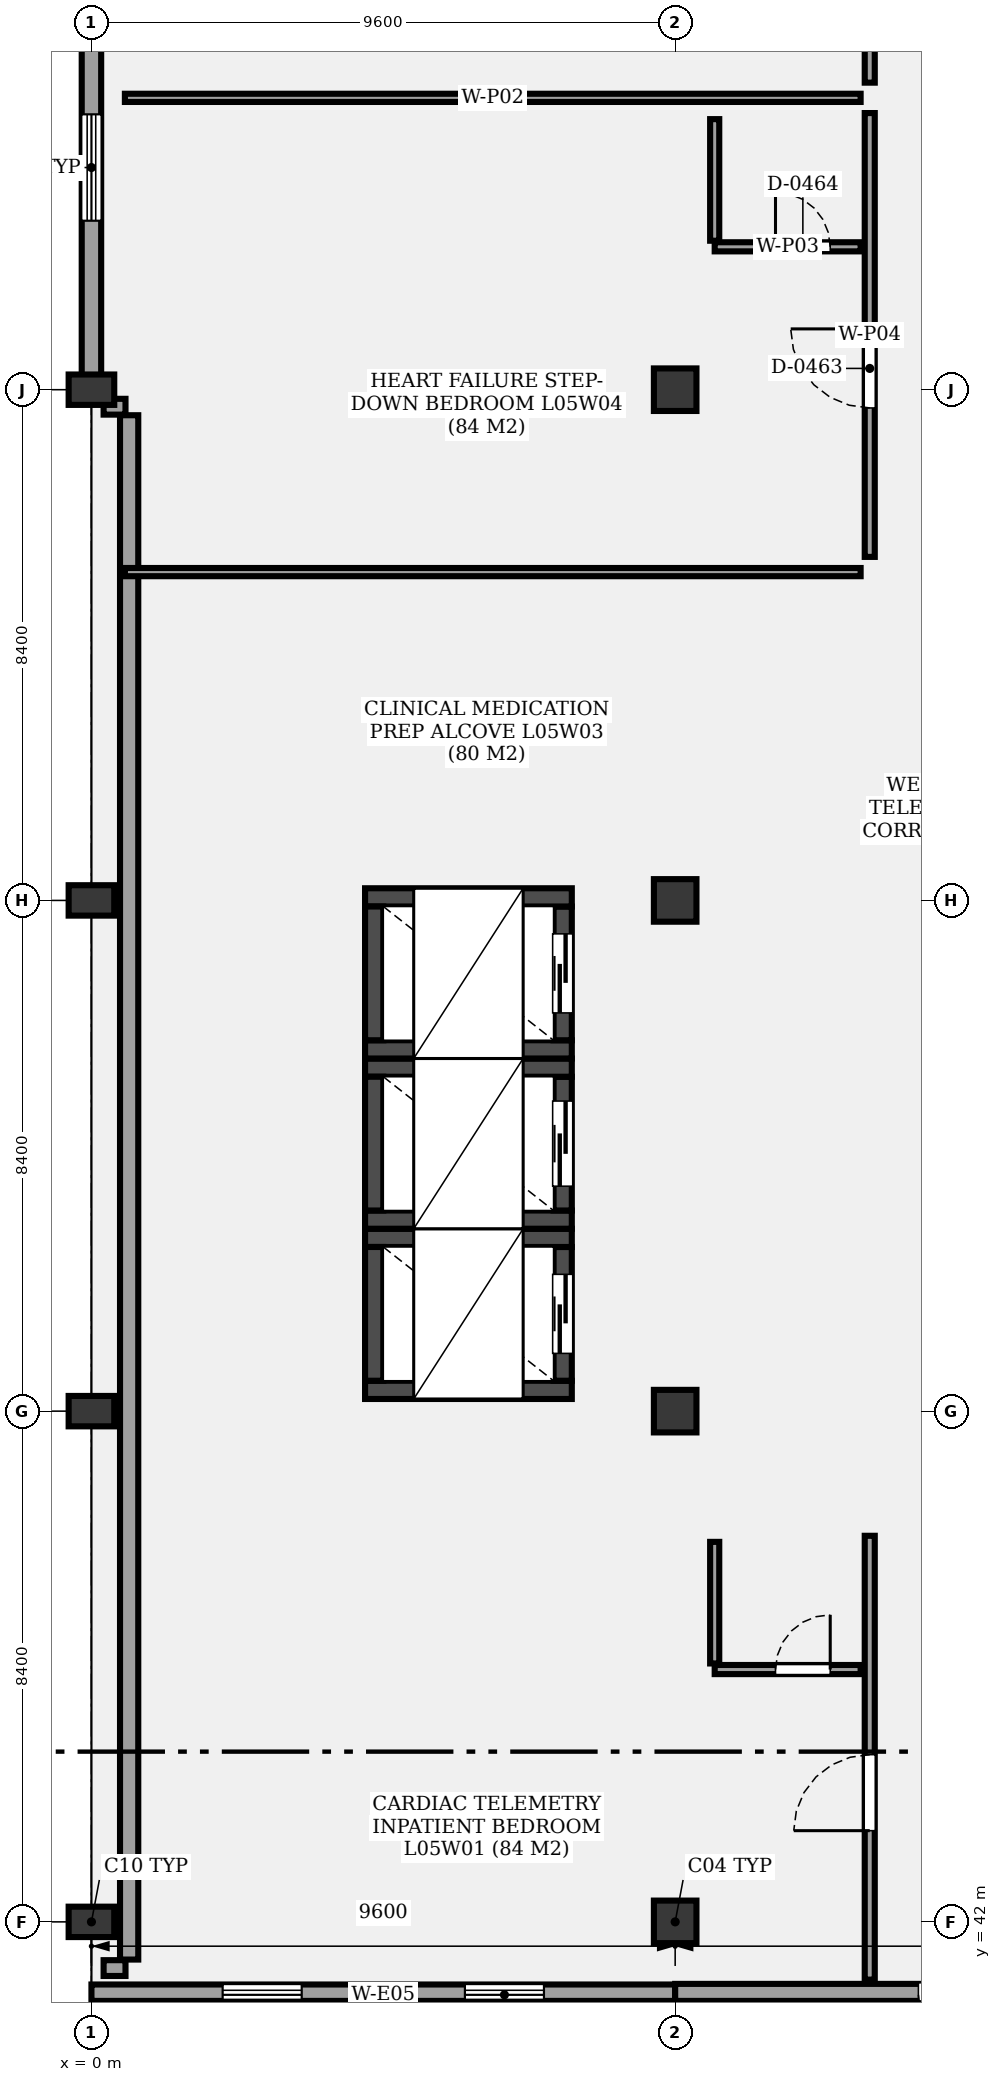
"""IFC4 building model, lengths in metres.
Left out: names, types, materials, properties, quantities, classifications, styles, units other than length and angle.
Written with IfcOpenShell. Run it as: python <this file> out.ifc"""

import sys

from ifc_helpers import new_model, si_unit, direction, frame, frame_2d, origin, origin_2d, place, context, subcontext, project, spatial, rectangle, extrude, element, fill, save


model = new_model("IFC4")
c1 = context("Model", 3, precision=1e-05, world=origin(), true_north=direction((0.0, 1.0)))
c2 = subcontext(c1, "Body", "Model", "MODEL_VIEW")
j1 = project(units=[si_unit("LENGTHUNIT", "METRE"), si_unit("PLANEANGLEUNIT", "RADIAN")], contexts=[c1])
p1 = place(None, origin())
s1 = spatial("IfcSite", under=j1, at=p1, CompositionType="ELEMENT")
p2 = place(p1, origin())
s2 = spatial("IfcBuilding", under=s1, at=p2, CompositionType="ELEMENT")
p3 = place(p2, frame((0.0, 0.0, 22.0)))
s3 = spatial("IfcBuildingStorey", under=s2, at=p3, CompositionType="ELEMENT", Elevation=22.0)
for number, where, z_axis, x_axis in (
    (1, (0.0, 42.0, 0.0), (0.0, 0.0, 1.0), (1.0, 0.0, 0.0)),
    (2, (0.0, 50.4, 0.0), (0.0, 0.0, 1.0), (1.0, 0.0, 0.0)),
    (3, (0.0, 58.8, 0.0), (0.0, 0.0, 1.0), (1.0, 0.0, 0.0)),
    (4, (0.0, 67.2, 0.0), (0.0, 0.0, 1.0), (1.0, 0.0, 0.0)),
):
    element("IfcColumn", number, at=place(p3, frame(where, z_axis=z_axis, x_axis=x_axis)), inside=s3, PredefinedType="COLUMN", context=c2, shape_type="SweptSolid", body=[
        extrude(rectangle(XDim=0.75, YDim=0.5, at=origin_2d()), origin(), (0.0, 0.0, 1.0), 4.2),
    ])
for number, where, z_axis, x_axis in (
    (5, (9.6, 42.0, 0.0), (0.0, 0.0, 1.0), (1.0, 0.0, 0.0)),
    (6, (9.6, 50.4, 0.0), (0.0, 0.0, 1.0), (1.0, 0.0, 0.0)),
    (7, (9.6, 58.8, 0.0), (0.0, 0.0, 1.0), (1.0, 0.0, 0.0)),
    (8, (9.6, 67.2, 0.0), (0.0, 0.0, 1.0), (1.0, 0.0, 0.0)),
):
    element("IfcColumn", number, at=place(p3, frame(where, z_axis=z_axis, x_axis=x_axis)), inside=s3, PredefinedType="COLUMN", context=c2, shape_type="SweptSolid", body=[
        extrude(rectangle(XDim=0.7, YDim=0.7, at=origin_2d()), origin(), (0.0, 0.0, 1.0), 4.2),
    ])
p4 = place(p3, frame((4.5, 50.75, 0.0), z_axis=(0.0, 0.0, 1.0), x_axis=(1.0, 0.0, 0.0)))
e9 = element("IfcWall", 9, at=p4, inside=s3, PredefinedType="SHEAR", context=c2, shape_type="SweptSolid", body=[
    extrude(rectangle(XDim=3.4, YDim=0.3, at=frame_2d((1.7, 0.0))), origin(), (0.0, 0.0, 1.0), 4.2),
])
p5 = place(p3, frame((7.75, 50.9, 0.0), z_axis=(0.0, 0.0, 1.0), x_axis=(0.0, 1.0, 0.0)))
e10 = element("IfcWall", 10, at=p5, inside=s3, PredefinedType="SHEAR", context=c2, shape_type="SweptSolid", body=[
    extrude(rectangle(XDim=2.2, YDim=0.3, at=frame_2d((1.1, 0.0))), origin(), (0.0, 0.0, 1.0), 4.2),
])
p6 = place(p5, frame((0.45, 0.0, 0.0)))
e11 = element("IfcOpeningElement", 11, at=p6, cuts=e10, PredefinedType="OPENING", context=c2, shape_type="SweptSolid", body=[
    extrude(rectangle(XDim=1.3, YDim=2.3, at=frame_2d((0.65, 1.15))), frame((0.0, 0.16, 0.0), z_axis=(0.0, -1.0, 0.0), x_axis=(1.0, 0.0, 0.0)), (0.0, 0.0, 1.0), 0.32),
])
p7 = place(p3, frame((7.9, 53.25, 0.0), z_axis=(0.0, 0.0, 1.0), x_axis=(-1.0, 0.0, 0.0)))
e12 = element("IfcWall", 12, at=p7, inside=s3, PredefinedType="SHEAR", context=c2, shape_type="SweptSolid", body=[
    extrude(rectangle(XDim=3.4, YDim=0.3, at=frame_2d((1.7, 0.0))), origin(), (0.0, 0.0, 1.0), 4.2),
])
p8 = place(p3, frame((4.65, 53.1, 0.0), z_axis=(0.0, 0.0, 1.0), x_axis=(0.0, -1.0, 0.0)))
e13 = element("IfcWall", 13, at=p8, inside=s3, PredefinedType="SHEAR", context=c2, shape_type="SweptSolid", body=[
    extrude(rectangle(XDim=2.2, YDim=0.3, at=frame_2d((1.1, 0.0))), origin(), (0.0, 0.0, 1.0), 4.2),
])
p9 = place(p3, frame((4.5, 53.55, 0.0), z_axis=(0.0, 0.0, 1.0), x_axis=(1.0, 0.0, 0.0)))
e14 = element("IfcWall", 14, at=p9, inside=s3, PredefinedType="SHEAR", context=c2, shape_type="SweptSolid", body=[
    extrude(rectangle(XDim=3.4, YDim=0.3, at=frame_2d((1.7, 0.0))), origin(), (0.0, 0.0, 1.0), 4.2),
])
p10 = place(p3, frame((7.75, 53.7, 0.0), z_axis=(0.0, 0.0, 1.0), x_axis=(0.0, 1.0, 0.0)))
e15 = element("IfcWall", 15, at=p10, inside=s3, PredefinedType="SHEAR", context=c2, shape_type="SweptSolid", body=[
    extrude(rectangle(XDim=2.2, YDim=0.3, at=frame_2d((1.1, 0.0))), origin(), (0.0, 0.0, 1.0), 4.2),
])
p11 = place(p10, frame((0.4, 0.0, 0.0)))
e16 = element("IfcOpeningElement", 16, at=p11, cuts=e15, PredefinedType="OPENING", context=c2, shape_type="SweptSolid", body=[
    extrude(rectangle(XDim=1.4, YDim=2.3, at=frame_2d((0.7, 1.15))), frame((0.0, 0.16, 0.0), z_axis=(0.0, -1.0, 0.0), x_axis=(1.0, 0.0, 0.0)), (0.0, 0.0, 1.0), 0.32),
])
p12 = place(p3, frame((7.9, 56.05, 0.0), z_axis=(0.0, 0.0, 1.0), x_axis=(-1.0, 0.0, 0.0)))
e17 = element("IfcWall", 17, at=p12, inside=s3, PredefinedType="SHEAR", context=c2, shape_type="SweptSolid", body=[
    extrude(rectangle(XDim=3.4, YDim=0.3, at=frame_2d((1.7, 0.0))), origin(), (0.0, 0.0, 1.0), 4.2),
])
p13 = place(p3, frame((4.65, 55.9, 0.0), z_axis=(0.0, 0.0, 1.0), x_axis=(0.0, -1.0, 0.0)))
e18 = element("IfcWall", 18, at=p13, inside=s3, PredefinedType="SHEAR", context=c2, shape_type="SweptSolid", body=[
    extrude(rectangle(XDim=2.2, YDim=0.3, at=frame_2d((1.1, 0.0))), origin(), (0.0, 0.0, 1.0), 4.2),
])
p14 = place(p3, frame((4.5, 56.35, 0.0), z_axis=(0.0, 0.0, 1.0), x_axis=(1.0, 0.0, 0.0)))
e19 = element("IfcWall", 19, at=p14, inside=s3, PredefinedType="SHEAR", context=c2, shape_type="SweptSolid", body=[
    extrude(rectangle(XDim=3.4, YDim=0.3, at=frame_2d((1.7, 0.0))), origin(), (0.0, 0.0, 1.0), 4.2),
])
p15 = place(p3, frame((7.75, 56.5, 0.0), z_axis=(0.0, 0.0, 1.0), x_axis=(0.0, 1.0, 0.0)))
e20 = element("IfcWall", 20, at=p15, inside=s3, PredefinedType="SHEAR", context=c2, shape_type="SweptSolid", body=[
    extrude(rectangle(XDim=2.2, YDim=0.3, at=frame_2d((1.1, 0.0))), origin(), (0.0, 0.0, 1.0), 4.2),
])
p16 = place(p15, frame((0.45, 0.0, 0.0)))
e21 = element("IfcOpeningElement", 21, at=p16, cuts=e20, PredefinedType="OPENING", context=c2, shape_type="SweptSolid", body=[
    extrude(rectangle(XDim=1.3, YDim=2.3, at=frame_2d((0.65, 1.15))), frame((0.0, 0.16, 0.0), z_axis=(0.0, -1.0, 0.0), x_axis=(1.0, 0.0, 0.0)), (0.0, 0.0, 1.0), 0.32),
])
p17 = place(p3, frame((7.9, 58.85, 0.0), z_axis=(0.0, 0.0, 1.0), x_axis=(-1.0, 0.0, 0.0)))
e22 = element("IfcWall", 22, at=p17, inside=s3, PredefinedType="SHEAR", context=c2, shape_type="SweptSolid", body=[
    extrude(rectangle(XDim=3.4, YDim=0.3, at=frame_2d((1.7, 0.0))), origin(), (0.0, 0.0, 1.0), 4.2),
])
p18 = place(p3, frame((4.65, 58.7, 0.0), z_axis=(0.0, 0.0, 1.0), x_axis=(0.0, -1.0, 0.0)))
e23 = element("IfcWall", 23, at=p18, inside=s3, PredefinedType="SHEAR", context=c2, shape_type="SweptSolid", body=[
    extrude(rectangle(XDim=2.2, YDim=0.3, at=frame_2d((1.1, 0.0))), origin(), (0.0, 0.0, 1.0), 4.2),
])
p19 = place(p3, frame((9.6, 40.8, 0.0), z_axis=(0.0, 0.0, 1.0), x_axis=(-1.0, 0.0, 0.0)))
e24 = element("IfcWall", 24, at=p19, inside=s3, PredefinedType="SOLIDWALL", context=c2, shape_type="SweptSolid", body=[
    extrude(rectangle(XDim=9.6, YDim=0.34, at=frame_2d((4.8, 0.0))), origin(), (0.0, 0.0, 1.0), 3.39),
])
p20 = place(p19, frame((2.158, 0.0, 0.85)))
e25 = element("IfcOpeningElement", 25, at=p20, cuts=e24, PredefinedType="OPENING", context=c2, shape_type="SweptSolid", body=[
    extrude(rectangle(XDim=1.3, YDim=1.4, at=frame_2d((0.65, 0.7))), frame((0.0, 0.18, 0.0), z_axis=(0.0, -1.0, 0.0), x_axis=(1.0, 0.0, 0.0)), (0.0, 0.0, 1.0), 0.36),
])
p21 = place(p19, frame((6.142, 0.0, 0.85)))
e26 = element("IfcOpeningElement", 26, at=p21, cuts=e24, PredefinedType="OPENING", context=c2, shape_type="SweptSolid", body=[
    extrude(rectangle(XDim=1.3, YDim=1.4, at=frame_2d((0.65, 0.7))), frame((0.0, 0.18, 0.0), z_axis=(0.0, -1.0, 0.0), x_axis=(1.0, 0.0, 0.0)), (0.0, 0.0, 1.0), 0.36),
])
p22 = place(p3, frame((19.2, 40.8, 0.0), z_axis=(0.0, 0.0, 1.0), x_axis=(-1.0, 0.0, 0.0)))
e27 = element("IfcWall", 27, at=p22, inside=s3, PredefinedType="SOLIDWALL", context=c2, shape_type="SweptSolid", body=[
    extrude(rectangle(XDim=9.6, YDim=0.36, at=frame_2d((4.8, 0.0))), origin(), (0.0, 0.0, 1.0), 3.39),
])
p23 = place(p22, frame((4.0, 0.0, 0.0)))
e28 = element("IfcOpeningElement", 28, at=p23, cuts=e27, PredefinedType="OPENING", context=c2, shape_type="SweptSolid", body=[
    extrude(rectangle(XDim=1.6, YDim=2.3, at=frame_2d((0.8, 1.15))), frame((0.0, 0.19, 0.0), z_axis=(0.0, -1.0, 0.0), x_axis=(1.0, 0.0, 0.0)), (0.0, 0.0, 1.0), 0.38),
])
for number, where, z_axis, x_axis in (
    (29, (0.2, 41.24, 0.0), (0.0, 0.0, 1.0), (1.0, 0.0, 0.0)),
    (30, (0.2, 66.92, 0.0), (0.0, 0.0, 1.0), (1.0, 0.0, 0.0)),
):
    element("IfcWall", number, at=place(p3, frame(where, z_axis=z_axis, x_axis=x_axis)), inside=s3, PredefinedType="SOLIDWALL", context=c2, shape_type="SweptSolid", body=[
        extrude(rectangle(XDim=0.36, YDim=0.26, at=frame_2d((0.18, 0.0))), origin(), (0.0, 0.0, 1.0), 3.39),
    ])
p24 = place(p3, frame((0.62, 41.38, 0.0), z_axis=(0.0, 0.0, 1.0), x_axis=(0.0, 1.0, 0.0)))
e31 = element("IfcWall", 31, at=p24, inside=s3, PredefinedType="SOLIDWALL", context=c2, shape_type="SweptSolid", body=[
    extrude(rectangle(XDim=25.4, YDim=0.3, at=frame_2d((12.7, 0.0))), origin(), (0.0, 0.0, 1.0), 3.39),
])
p25 = place(p3, frame((0.0, 67.2, 0.0), z_axis=(0.0, 0.0, 1.0), x_axis=(0.0, 1.0, 0.0)))
e32 = element("IfcWall", 32, at=p25, inside=s3, PredefinedType="SOLIDWALL", context=c2, shape_type="SweptSolid", body=[
    extrude(rectangle(XDim=12.44, YDim=0.32, at=frame_2d((6.22, 0.0))), origin(), (0.0, 0.0, 1.0), 3.39),
])
p26 = place(p25, frame((2.779, 0.0, 0.85)))
e33 = element("IfcOpeningElement", 33, at=p26, cuts=e32, PredefinedType="OPENING", context=c2, shape_type="SweptSolid", body=[
    extrude(rectangle(XDim=1.75, YDim=1.4, at=frame_2d((0.875, 0.7))), frame((0.0, 0.17, 0.0), z_axis=(0.0, -1.0, 0.0), x_axis=(1.0, 0.0, 0.0)), (0.0, 0.0, 1.0), 0.34),
])
p27 = place(p3, frame((12.8, 41.05, 0.0), z_axis=(0.0, 0.0, 1.0), x_axis=(0.0, 1.0, 0.0)))
e34 = element("IfcWall", 34, at=p27, inside=s3, PredefinedType="PARTITIONING", context=c2, shape_type="SweptSolid", body=[
    extrude(rectangle(XDim=7.3, YDim=0.165, at=frame_2d((3.65, 0.0))), origin(), (0.0, 0.0, 1.0), 3.3),
])
p28 = place(p27, frame((2.45, 0.0, 0.0)))
e35 = element("IfcOpeningElement", 35, at=p28, cuts=e34, PredefinedType="OPENING", context=c2, shape_type="SweptSolid", body=[
    extrude(rectangle(XDim=1.25, YDim=2.2, at=frame_2d((0.625, 1.1))), frame((0.0, 0.093, 0.0), z_axis=(0.0, -1.0, 0.0), x_axis=(1.0, 0.0, 0.0)), (0.0, 0.0, 1.0), 0.185),
])
p29 = place(p3, frame((10.25, 46.15, 0.0), z_axis=(0.0, 0.0, 1.0), x_axis=(1.0, 0.0, 0.0)))
e36 = element("IfcWall", 36, at=p29, inside=s3, PredefinedType="PARTITIONING", context=c2, shape_type="SweptSolid", body=[
    extrude(rectangle(XDim=2.4, YDim=0.15, at=frame_2d((1.2, 0.0))), origin(), (0.0, 0.0, 1.0), 3.3),
])
p30 = place(p29, frame((1.0, 0.0, 0.0)))
e37 = element("IfcOpeningElement", 37, at=p30, cuts=e36, PredefinedType="OPENING", context=c2, shape_type="SweptSolid", body=[
    extrude(rectangle(XDim=0.9, YDim=2.1, at=frame_2d((0.45, 1.05))), frame((0.0, 0.085, 0.0), z_axis=(0.0, -1.0, 0.0), x_axis=(1.0, 0.0, 0.0)), (0.0, 0.0, 1.0), 0.17),
])
p31 = place(p3, frame((10.25, 46.25, 0.0), z_axis=(0.0, 0.0, 1.0), x_axis=(0.0, 1.0, 0.0)))
e38 = element("IfcWall", 38, at=p31, inside=s3, PredefinedType="PARTITIONING", context=c2, shape_type="SweptSolid", body=[
    extrude(rectangle(XDim=2.0, YDim=0.15, at=frame_2d((1.0, 0.0))), origin(), (0.0, 0.0, 1.0), 3.3),
])
p32 = place(p3, frame((12.8, 64.45, 0.0), z_axis=(0.0, 0.0, 1.0), x_axis=(0.0, 1.0, 0.0)))
e39 = element("IfcWall", 39, at=p32, inside=s3, PredefinedType="PARTITIONING", context=c2, shape_type="SweptSolid", body=[
    extrude(rectangle(XDim=7.3, YDim=0.165, at=frame_2d((3.65, 0.0))), origin(), (0.0, 0.0, 1.0), 3.3),
])
p33 = place(p32, frame((2.45, 0.0, 0.0)))
e40 = element("IfcOpeningElement", 40, at=p33, cuts=e39, PredefinedType="OPENING", context=c2, shape_type="SweptSolid", body=[
    extrude(rectangle(XDim=1.3, YDim=2.2, at=frame_2d((0.65, 1.1))), frame((0.0, 0.093, 0.0), z_axis=(0.0, -1.0, 0.0), x_axis=(1.0, 0.0, 0.0)), (0.0, 0.0, 1.0), 0.185),
])
p34 = place(p3, frame((10.25, 69.55, 0.0), z_axis=(0.0, 0.0, 1.0), x_axis=(1.0, 0.0, 0.0)))
e41 = element("IfcWall", 41, at=p34, inside=s3, PredefinedType="PARTITIONING", context=c2, shape_type="SweptSolid", body=[
    extrude(rectangle(XDim=2.4, YDim=0.15, at=frame_2d((1.2, 0.0))), origin(), (0.0, 0.0, 1.0), 3.3),
])
p35 = place(p34, frame((1.0, 0.0, 0.0)))
e42 = element("IfcOpeningElement", 42, at=p35, cuts=e41, PredefinedType="OPENING", context=c2, shape_type="SweptSolid", body=[
    extrude(rectangle(XDim=0.9, YDim=2.1, at=frame_2d((0.45, 1.05))), frame((0.0, 0.085, 0.0), z_axis=(0.0, -1.0, 0.0), x_axis=(1.0, 0.0, 0.0)), (0.0, 0.0, 1.0), 0.17),
])
p36 = place(p3, frame((10.25, 69.65, 0.0), z_axis=(0.0, 0.0, 1.0), x_axis=(0.0, 1.0, 0.0)))
e43 = element("IfcWall", 43, at=p36, inside=s3, PredefinedType="PARTITIONING", context=c2, shape_type="SweptSolid", body=[
    extrude(rectangle(XDim=2.0, YDim=0.15, at=frame_2d((1.0, 0.0))), origin(), (0.0, 0.0, 1.0), 3.3),
])
p37 = place(p3, frame((0.55, 64.2, 0.0), z_axis=(0.0, 0.0, 1.0), x_axis=(1.0, 0.0, 0.0)))
e44 = element("IfcWall", 44, at=p37, inside=s3, PredefinedType="PARTITIONING", context=c2, shape_type="SweptSolid", body=[
    extrude(rectangle(XDim=12.1, YDim=0.135, at=frame_2d((6.05, 0.0))), origin(), (0.0, 0.0, 1.0), 3.3),
])
p38 = place(p3, frame((12.8, 72.25, 0.0), z_axis=(0.0, 0.0, 1.0), x_axis=(0.0, 1.0, 0.0)))
e45 = element("IfcWall", 45, at=p38, inside=s3, PredefinedType="PARTITIONING", context=c2, shape_type="SweptSolid", body=[
    extrude(rectangle(XDim=7.3, YDim=0.165, at=frame_2d((3.65, 0.0))), origin(), (0.0, 0.0, 1.0), 3.3),
])
p39 = place(p38, frame((1.75, 0.0, 0.0)))
e46 = element("IfcOpeningElement", 46, at=p39, cuts=e45, PredefinedType="OPENING", context=c2, shape_type="SweptSolid", body=[
    extrude(rectangle(XDim=1.25, YDim=2.2, at=frame_2d((0.625, 1.1))), frame((0.0, 0.093, 0.0), z_axis=(0.0, -1.0, 0.0), x_axis=(1.0, 0.0, 0.0)), (0.0, 0.0, 1.0), 0.185),
])
p40 = place(p3, frame((0.55, 72.0, 0.0), z_axis=(0.0, 0.0, 1.0), x_axis=(1.0, 0.0, 0.0)))
e47 = element("IfcWall", 47, at=p40, inside=s3, PredefinedType="PARTITIONING", context=c2, shape_type="SweptSolid", body=[
    extrude(rectangle(XDim=12.1, YDim=0.135, at=frame_2d((6.05, 0.0))), origin(), (0.0, 0.0, 1.0), 3.3),
])
p41 = place(p6, origin())
e48 = element("IfcDoor", 48, at=p41, inside=s3, OperationType="SLIDING_TO_RIGHT", PredefinedType="DOOR", context=c2, shape_type="SweptSolid", body=[
    extrude(rectangle(XDim=1.3, YDim=2.3, at=frame_2d((0.65, 1.15))), frame((0.0, 0.025, 0.0), z_axis=(0.0, -1.0, 0.0), x_axis=(1.0, 0.0, 0.0)), (0.0, 0.0, 1.0), 0.05),
])
fill(e11, e48)
p42 = place(p11, origin())
e49 = element("IfcDoor", 49, at=p42, inside=s3, OperationType="SLIDING_TO_LEFT", PredefinedType="DOOR", context=c2, shape_type="SweptSolid", body=[
    extrude(rectangle(XDim=1.4, YDim=2.3, at=frame_2d((0.7, 1.15))), frame((0.0, 0.025, 0.0), z_axis=(0.0, -1.0, 0.0), x_axis=(1.0, 0.0, 0.0)), (0.0, 0.0, 1.0), 0.05),
])
fill(e16, e49)
p43 = place(p16, origin())
e50 = element("IfcDoor", 50, at=p43, inside=s3, OperationType="SLIDING_TO_RIGHT", PredefinedType="DOOR", context=c2, shape_type="SweptSolid", body=[
    extrude(rectangle(XDim=1.3, YDim=2.3, at=frame_2d((0.65, 1.15))), frame((0.0, 0.025, 0.0), z_axis=(0.0, -1.0, 0.0), x_axis=(1.0, 0.0, 0.0)), (0.0, 0.0, 1.0), 0.05),
])
fill(e21, e50)
p44 = place(p20, origin())
e51 = element("IfcWindow", 51, at=p44, inside=s3, PartitioningType="SINGLE_PANEL", PredefinedType="WINDOW", context=c2, shape_type="SweptSolid", body=[
    extrude(rectangle(XDim=1.3, YDim=1.4, at=frame_2d((0.65, 0.7))), frame((0.0, 0.03, 0.0), z_axis=(0.0, -1.0, 0.0), x_axis=(1.0, 0.0, 0.0)), (0.0, 0.0, 1.0), 0.06),
])
fill(e25, e51)
p45 = place(p21, origin())
e52 = element("IfcWindow", 52, at=p45, inside=s3, PartitioningType="SINGLE_PANEL", PredefinedType="WINDOW", context=c2, shape_type="SweptSolid", body=[
    extrude(rectangle(XDim=1.3, YDim=1.4, at=frame_2d((0.65, 0.7))), frame((0.0, 0.03, 0.0), z_axis=(0.0, -1.0, 0.0), x_axis=(1.0, 0.0, 0.0)), (0.0, 0.0, 1.0), 0.06),
])
fill(e26, e52)
p46 = place(p23, origin())
e53 = element("IfcDoor", 53, at=p46, inside=s3, OperationType="SINGLE_SWING_LEFT", PredefinedType="DOOR", context=c2, shape_type="SweptSolid", body=[
    extrude(rectangle(XDim=1.6, YDim=2.3, at=frame_2d((0.8, 1.15))), frame((0.0, 0.025, 0.0), z_axis=(0.0, -1.0, 0.0), x_axis=(1.0, 0.0, 0.0)), (0.0, 0.0, 1.0), 0.05),
])
fill(e28, e53)
p47 = place(p26, origin())
e54 = element("IfcWindow", 54, at=p47, inside=s3, PartitioningType="SINGLE_PANEL", PredefinedType="WINDOW", context=c2, shape_type="SweptSolid", body=[
    extrude(rectangle(XDim=1.75, YDim=1.4, at=frame_2d((0.875, 0.7))), frame((0.0, 0.03, 0.0), z_axis=(0.0, -1.0, 0.0), x_axis=(1.0, 0.0, 0.0)), (0.0, 0.0, 1.0), 0.06),
])
fill(e33, e54)
p48 = place(p28, origin())
e55 = element("IfcDoor", 55, at=p48, inside=s3, OperationType="SINGLE_SWING_LEFT", PredefinedType="DOOR", context=c2, shape_type="SweptSolid", body=[
    extrude(rectangle(XDim=1.25, YDim=2.2, at=frame_2d((0.625, 1.1))), frame((0.0, 0.025, 0.0), z_axis=(0.0, -1.0, 0.0), x_axis=(1.0, 0.0, 0.0)), (0.0, 0.0, 1.0), 0.05),
])
fill(e35, e55)
p49 = place(p30, origin())
e56 = element("IfcDoor", 56, at=p49, inside=s3, OperationType="SINGLE_SWING_RIGHT", PredefinedType="DOOR", context=c2, shape_type="SweptSolid", body=[
    extrude(rectangle(XDim=0.9, YDim=2.1, at=frame_2d((0.45, 1.05))), frame((0.0, 0.025, 0.0), z_axis=(0.0, -1.0, 0.0), x_axis=(1.0, 0.0, 0.0)), (0.0, 0.0, 1.0), 0.05),
])
fill(e37, e56)
p50 = place(p33, origin())
e57 = element("IfcDoor", 57, at=p50, inside=s3, OperationType="SINGLE_SWING_RIGHT", PredefinedType="DOOR", context=c2, shape_type="SweptSolid", body=[
    extrude(rectangle(XDim=1.3, YDim=2.2, at=frame_2d((0.65, 1.1))), frame((0.0, 0.025, 0.0), z_axis=(0.0, -1.0, 0.0), x_axis=(1.0, 0.0, 0.0)), (0.0, 0.0, 1.0), 0.05),
])
fill(e40, e57)
p51 = place(p35, origin())
e58 = element("IfcDoor", 58, at=p51, inside=s3, OperationType="SINGLE_SWING_LEFT", PredefinedType="DOOR", context=c2, shape_type="SweptSolid", body=[
    extrude(rectangle(XDim=0.9, YDim=2.1, at=frame_2d((0.45, 1.05))), frame((0.0, 0.025, 0.0), z_axis=(0.0, -1.0, 0.0), x_axis=(1.0, 0.0, 0.0)), (0.0, 0.0, 1.0), 0.05),
])
fill(e42, e58)
save(model, sys.argv[1])
